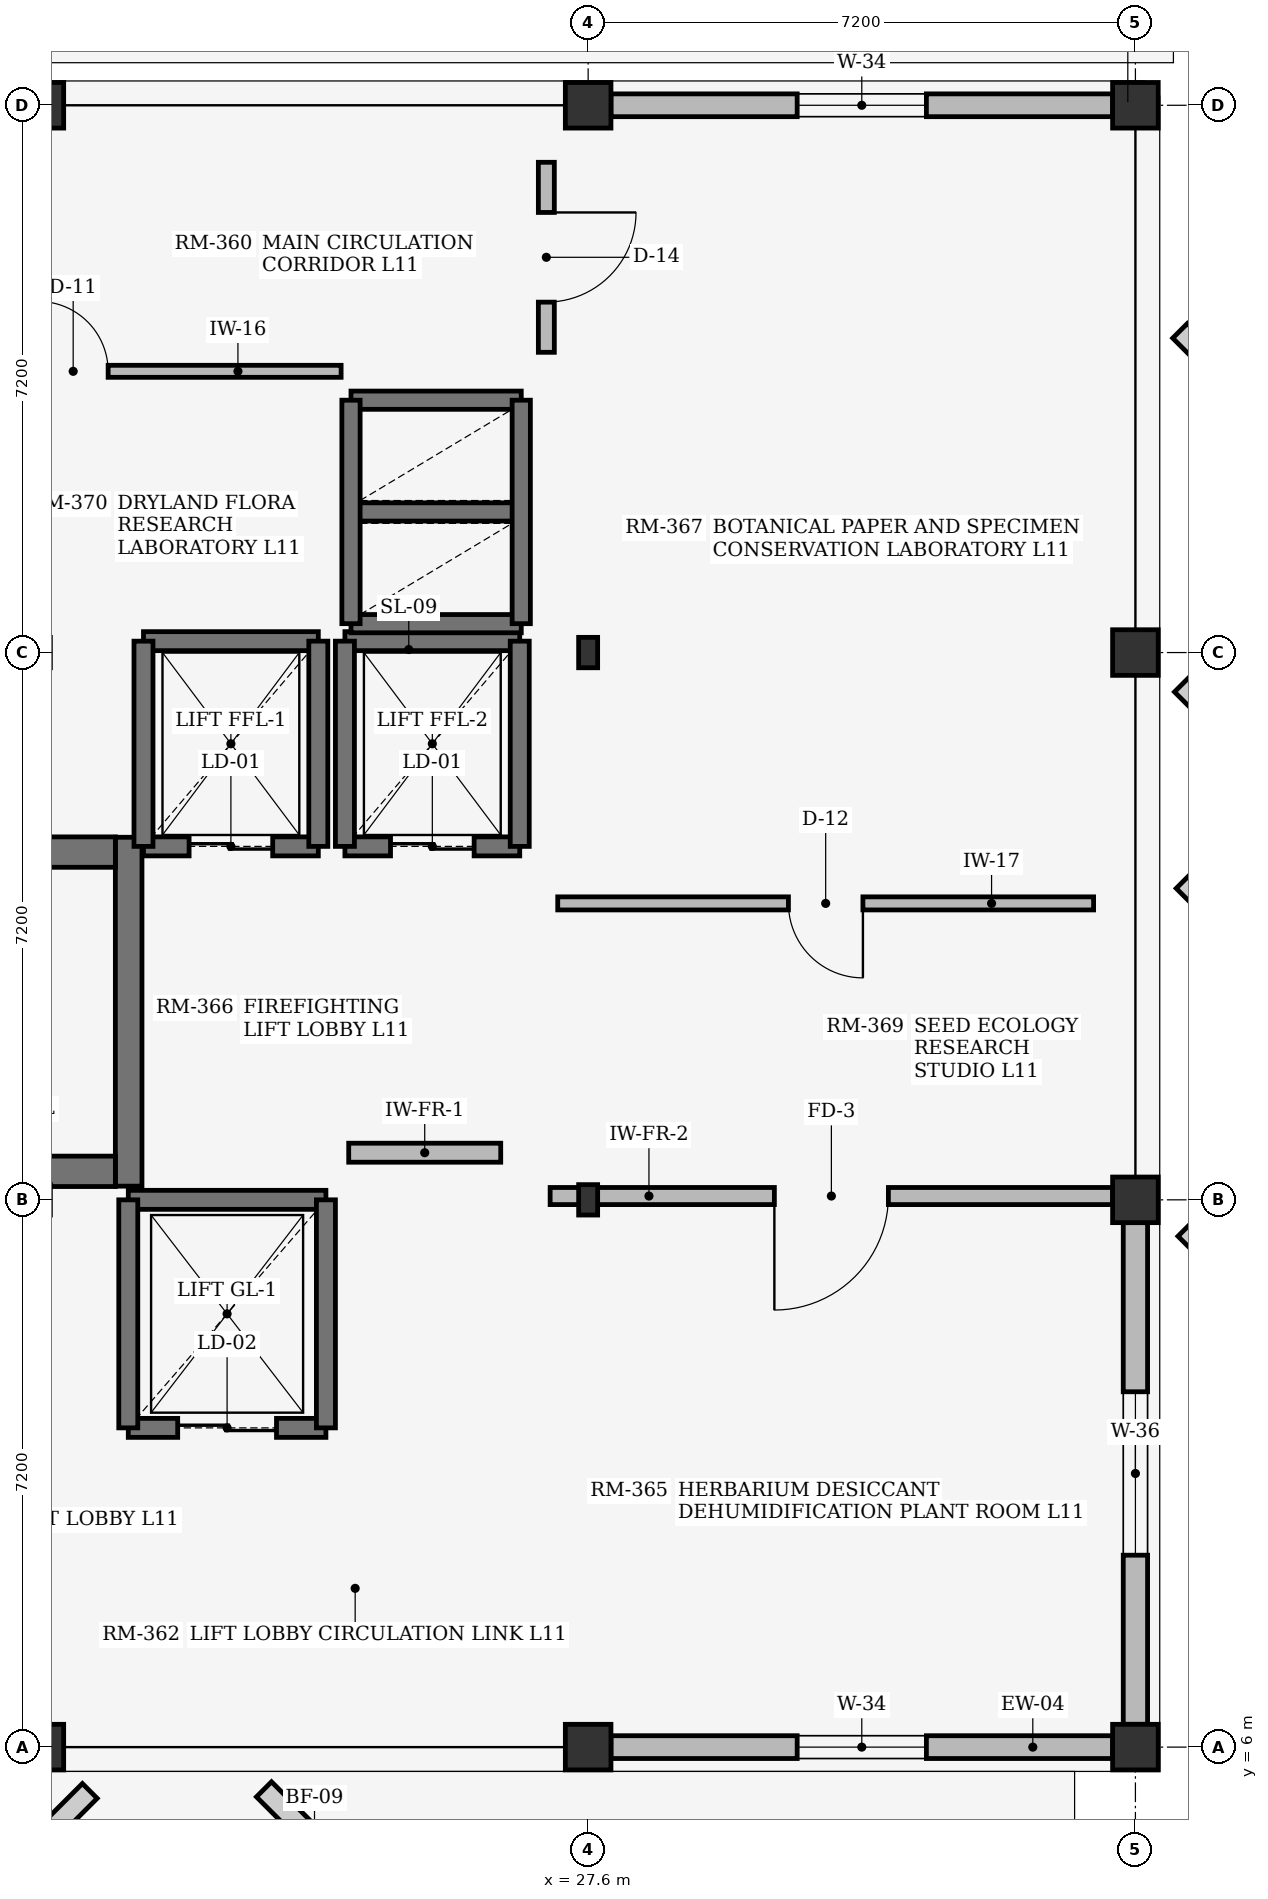
"""IFC4 building model, lengths in metres.
Left out: names, types, materials, properties, quantities, classifications, styles, units other than length and angle.
Written with IfcOpenShell. Run it as: python <this file> out.ifc"""

import sys

from ifc_helpers import new_model, si_unit, direction, frame, frame_2d, origin, origin_2d, place, context, subcontext, project, spatial, rectangle, i_section, extrude, element, fill, save


model = new_model("IFC4")
c1 = context("Model", 3, precision=1e-05, world=origin(), true_north=direction((0.0, 1.0)))
c2 = subcontext(c1, "Body", "Model", "MODEL_VIEW")
j1 = project(units=[si_unit("LENGTHUNIT", "METRE"), si_unit("PLANEANGLEUNIT", "RADIAN")], contexts=[c1])
p1 = place(None, origin())
s1 = spatial("IfcSite", under=j1, at=p1, CompositionType="ELEMENT")
p2 = place(p1, origin())
s2 = spatial("IfcBuilding", under=s1, at=p2, CompositionType="ELEMENT")
p3 = place(p2, frame((0.0, 0.0, 44.4)))
s3 = spatial("IfcBuildingStorey", under=s2, at=p3, CompositionType="ELEMENT", Elevation=44.4)
for number, where, z_axis, x_axis in (
    (1, (20.4, 6.0, 0.0), (0.0, 0.0, 1.0), (1.0, 0.0, 0.0)),
    (2, (20.4, 27.6, 0.0), (0.0, 0.0, 1.0), (1.0, 0.0, 0.0)),
    (3, (27.6, 6.0, 0.0), (0.0, 0.0, 1.0), (1.0, 0.0, 0.0)),
):
    element("IfcColumn", number, at=place(p3, frame(where, z_axis=z_axis, x_axis=x_axis)), inside=s3, PredefinedType="COLUMN", context=c2, shape_type="SweptSolid", body=[
        extrude(rectangle(XDim=0.6, YDim=0.6, at=origin_2d()), origin(), (0.0, 0.0, 1.0), 3.69),
    ])
for number, where, z_axis, x_axis in (
    (4, (27.6, 13.2, 0.0), (0.0, 0.0, 1.0), (1.0, 0.0, 0.0)),
    (5, (27.6, 20.4, 0.0), (0.0, 0.0, 1.0), (1.0, 0.0, 0.0)),
):
    element("IfcColumn", number, at=place(p3, frame(where, z_axis=z_axis, x_axis=x_axis)), inside=s3, PredefinedType="COLUMN", context=c2, shape_type="SweptSolid", body=[
        extrude(i_section(OverallWidth=0.25, OverallDepth=0.4, WebThickness=0.01, FlangeThickness=0.013, at=origin_2d()), origin(), (0.0, 0.0, 1.0), 3.69),
    ])
for number, where, z_axis, x_axis in (
    (6, (27.6, 27.6, 0.0), (0.0, 0.0, 1.0), (1.0, 0.0, 0.0)),
    (7, (34.8, 6.0, 0.0), (0.0, 0.0, 1.0), (1.0, 0.0, 0.0)),
    (8, (34.8, 13.2, 0.0), (0.0, 0.0, 1.0), (1.0, 0.0, 0.0)),
    (9, (34.8, 20.4, 0.0), (0.0, 0.0, 1.0), (1.0, 0.0, 0.0)),
    (10, (34.8, 27.6, 0.0), (0.0, 0.0, 1.0), (1.0, 0.0, 0.0)),
):
    element("IfcColumn", number, at=place(p3, frame(where, z_axis=z_axis, x_axis=x_axis)), inside=s3, PredefinedType="COLUMN", context=c2, shape_type="SweptSolid", body=[
        extrude(rectangle(XDim=0.6, YDim=0.6, at=origin_2d()), origin(), (0.0, 0.0, 1.0), 3.69),
    ])
p4 = place(p3, frame((27.9, 6.0, 0.0), z_axis=(0.0, 0.0, 1.0), x_axis=(1.0, 0.0, 0.0)))
e11 = element("IfcWall", 11, at=p4, inside=s3, PredefinedType="STANDARD", context=c2, shape_type="SweptSolid", body=[
    extrude(rectangle(XDim=6.6, YDim=0.3, at=frame_2d((3.3, 0.0))), origin(), (0.0, 0.0, 1.0), 3.17),
])
p5 = place(p4, frame((2.45, 0.0, 0.75)))
e12 = element("IfcOpeningElement", 12, at=p5, cuts=e11, PredefinedType="OPENING", context=c2, shape_type="SweptSolid", body=[
    extrude(rectangle(XDim=1.7, YDim=1.35, at=frame_2d((0.85, 0.675))), frame((0.0, 0.16, 0.0), z_axis=(0.0, -1.0, 0.0), x_axis=(1.0, 0.0, 0.0)), (0.0, 0.0, 1.0), 0.32),
])
p6 = place(p3, frame((27.9, 27.6, 0.0), z_axis=(0.0, 0.0, 1.0), x_axis=(1.0, 0.0, 0.0)))
e13 = element("IfcWall", 13, at=p6, inside=s3, PredefinedType="STANDARD", context=c2, shape_type="SweptSolid", body=[
    extrude(rectangle(XDim=6.6, YDim=0.3, at=frame_2d((3.3, 0.0))), origin(), (0.0, 0.0, 1.0), 3.17),
])
p7 = place(p6, frame((2.45, 0.0, 0.75)))
e14 = element("IfcOpeningElement", 14, at=p7, cuts=e13, PredefinedType="OPENING", context=c2, shape_type="SweptSolid", body=[
    extrude(rectangle(XDim=1.7, YDim=1.35, at=frame_2d((0.85, 0.675))), frame((0.0, 0.16, 0.0), z_axis=(0.0, -1.0, 0.0), x_axis=(1.0, 0.0, 0.0)), (0.0, 0.0, 1.0), 0.32),
])
p8 = place(p3, frame((34.8, 6.3, 0.0), z_axis=(0.0, 0.0, 1.0), x_axis=(0.0, 1.0, 0.0)))
e15 = element("IfcWall", 15, at=p8, inside=s3, PredefinedType="STANDARD", context=c2, shape_type="SweptSolid", body=[
    extrude(rectangle(XDim=6.6, YDim=0.32, at=frame_2d((3.3, 0.0))), origin(), (0.0, 0.0, 1.0), 3.17),
])
p9 = place(p8, frame((2.225, 0.0, 0.75)))
e16 = element("IfcOpeningElement", 16, at=p9, cuts=e15, PredefinedType="OPENING", context=c2, shape_type="SweptSolid", body=[
    extrude(rectangle(XDim=2.15, YDim=1.35, at=frame_2d((1.075, 0.675))), frame((0.0, 0.17, 0.0), z_axis=(0.0, -1.0, 0.0), x_axis=(1.0, 0.0, 0.0)), (0.0, 0.0, 1.0), 0.34),
])
p10 = place(p3, frame((21.555, 13.38, 0.0), z_axis=(0.0, 0.0, 1.0), x_axis=(0.0, 1.0, 0.0)))
e17 = element("IfcWall", 17, at=p10, inside=s3, PredefinedType="SHEAR", context=c2, shape_type="SweptSolid", body=[
    extrude(rectangle(XDim=4.59, YDim=0.35, at=frame_2d((2.295, 0.0))), origin(), (0.0, 0.0, 1.0), 3.69),
])
for number, where, z_axis, x_axis in (
    (18, (13.4, 13.575, 0.0), (0.0, 0.0, 1.0), (1.0, 0.0, 0.0)),
    (19, (13.4, 17.775, 0.0), (0.0, 0.0, 1.0), (1.0, 0.0, 0.0)),
):
    element("IfcWall", number, at=place(p3, frame(where, z_axis=z_axis, x_axis=x_axis)), inside=s3, PredefinedType="SHEAR", context=c2, shape_type="SweptSolid", body=[
        extrude(rectangle(XDim=7.98, YDim=0.4, at=frame_2d((3.99, 0.0))), origin(), (0.0, 0.0, 1.0), 3.69),
    ])
p11 = place(p3, frame((21.75, 17.85, 0.0), z_axis=(0.0, 0.0, 1.0), x_axis=(1.0, 0.0, 0.0)))
e20 = element("IfcWall", 20, at=p11, inside=s3, PredefinedType="SHEAR", context=c2, shape_type="SweptSolid", body=[
    extrude(rectangle(XDim=2.3, YDim=0.25, at=frame_2d((1.15, 0.0))), origin(), (0.0, 0.0, 1.0), 3.69),
])
p12 = place(p11, frame((0.6, 0.0, 0.0)))
e21 = element("IfcOpeningElement", 21, at=p12, cuts=e20, PredefinedType="OPENING", context=c2, shape_type="SweptSolid", body=[
    extrude(rectangle(XDim=1.1, YDim=2.2, at=frame_2d((0.55, 1.1))), frame((0.0, 0.135, 0.0), z_axis=(0.0, -1.0, 0.0), x_axis=(1.0, 0.0, 0.0)), (0.0, 0.0, 1.0), 0.27),
])
p13 = place(p3, frame((21.75, 20.55, 0.0), z_axis=(0.0, 0.0, 1.0), x_axis=(1.0, 0.0, 0.0)))
e22 = element("IfcWall", 22, at=p13, inside=s3, PredefinedType="SHEAR", context=c2, shape_type="SweptSolid", body=[
    extrude(rectangle(XDim=2.3, YDim=0.25, at=frame_2d((1.15, 0.0))), origin(), (0.0, 0.0, 1.0), 3.69),
])
for number, where, z_axis, x_axis in (
    (23, (21.75, 17.85, 0.0), (0.0, 0.0, 1.0), (0.0, 1.0, 0.0)),
    (24, (24.05, 17.85, 0.0), (0.0, 0.0, 1.0), (0.0, 1.0, 0.0)),
):
    element("IfcWall", number, at=place(p3, frame(where, z_axis=z_axis, x_axis=x_axis)), inside=s3, PredefinedType="SHEAR", context=c2, shape_type="SweptSolid", body=[
        extrude(rectangle(XDim=2.7, YDim=0.25, at=frame_2d((1.35, 0.0))), origin(), (0.0, 0.0, 1.0), 3.69),
    ])
p14 = place(p3, frame((24.4, 17.85, 0.0), z_axis=(0.0, 0.0, 1.0), x_axis=(1.0, 0.0, 0.0)))
e25 = element("IfcWall", 25, at=p14, inside=s3, PredefinedType="SHEAR", context=c2, shape_type="SweptSolid", body=[
    extrude(rectangle(XDim=2.3, YDim=0.25, at=frame_2d((1.15, 0.0))), origin(), (0.0, 0.0, 1.0), 3.69),
])
p15 = place(p14, frame((0.6, 0.0, 0.0)))
e26 = element("IfcOpeningElement", 26, at=p15, cuts=e25, PredefinedType="OPENING", context=c2, shape_type="SweptSolid", body=[
    extrude(rectangle(XDim=1.1, YDim=2.2, at=frame_2d((0.55, 1.1))), frame((0.0, 0.135, 0.0), z_axis=(0.0, -1.0, 0.0), x_axis=(1.0, 0.0, 0.0)), (0.0, 0.0, 1.0), 0.27),
])
p16 = place(p3, frame((24.4, 20.55, 0.0), z_axis=(0.0, 0.0, 1.0), x_axis=(1.0, 0.0, 0.0)))
e27 = element("IfcWall", 27, at=p16, inside=s3, PredefinedType="SHEAR", context=c2, shape_type="SweptSolid", body=[
    extrude(rectangle(XDim=2.3, YDim=0.25, at=frame_2d((1.15, 0.0))), origin(), (0.0, 0.0, 1.0), 3.69),
])
for number, where, z_axis, x_axis in (
    (28, (24.4, 17.85, 0.0), (0.0, 0.0, 1.0), (0.0, 1.0, 0.0)),
    (29, (26.7, 17.85, 0.0), (0.0, 0.0, 1.0), (0.0, 1.0, 0.0)),
):
    element("IfcWall", number, at=place(p3, frame(where, z_axis=z_axis, x_axis=x_axis)), inside=s3, PredefinedType="SHEAR", context=c2, shape_type="SweptSolid", body=[
        extrude(rectangle(XDim=2.7, YDim=0.25, at=frame_2d((1.35, 0.0))), origin(), (0.0, 0.0, 1.0), 3.69),
    ])
p17 = place(p3, frame((21.55, 10.2, 0.0), z_axis=(0.0, 0.0, 1.0), x_axis=(1.0, 0.0, 0.0)))
e30 = element("IfcWall", 30, at=p17, inside=s3, PredefinedType="SHEAR", context=c2, shape_type="SweptSolid", body=[
    extrude(rectangle(XDim=2.6, YDim=0.25, at=frame_2d((1.3, 0.0))), origin(), (0.0, 0.0, 1.0), 3.69),
])
p18 = place(p17, frame((0.65, 0.0, 0.0)))
e31 = element("IfcOpeningElement", 31, at=p18, cuts=e30, PredefinedType="OPENING", context=c2, shape_type="SweptSolid", body=[
    extrude(rectangle(XDim=1.3, YDim=2.25, at=frame_2d((0.65, 1.125))), frame((0.0, 0.135, 0.0), z_axis=(0.0, -1.0, 0.0), x_axis=(1.0, 0.0, 0.0)), (0.0, 0.0, 1.0), 0.27),
])
p19 = place(p3, frame((21.55, 13.2, 0.0), z_axis=(0.0, 0.0, 1.0), x_axis=(1.0, 0.0, 0.0)))
e32 = element("IfcWall", 32, at=p19, inside=s3, PredefinedType="SHEAR", context=c2, shape_type="SweptSolid", body=[
    extrude(rectangle(XDim=2.6, YDim=0.25, at=frame_2d((1.3, 0.0))), origin(), (0.0, 0.0, 1.0), 3.69),
])
for number, where, z_axis, x_axis in (
    (33, (21.55, 10.2, 0.0), (0.0, 0.0, 1.0), (0.0, 1.0, 0.0)),
    (34, (24.15, 10.2, 0.0), (0.0, 0.0, 1.0), (0.0, 1.0, 0.0)),
):
    element("IfcWall", number, at=place(p3, frame(where, z_axis=z_axis, x_axis=x_axis)), inside=s3, PredefinedType="SHEAR", context=c2, shape_type="SweptSolid", body=[
        extrude(rectangle(XDim=3.0, YDim=0.25, at=frame_2d((1.5, 0.0))), origin(), (0.0, 0.0, 1.0), 3.69),
    ])
for number, where, z_axis, x_axis in (
    (35, (24.48, 20.78, 0.0), (0.0, 0.0, 1.0), (1.0, 0.0, 0.0)),
    (36, (24.48, 22.25, 0.0), (0.0, 0.0, 1.0), (1.0, 0.0, 0.0)),
    (37, (24.48, 23.72, 0.0), (0.0, 0.0, 1.0), (1.0, 0.0, 0.0)),
):
    element("IfcWall", number, at=place(p3, frame(where, z_axis=z_axis, x_axis=x_axis)), inside=s3, PredefinedType="SHEAR", context=c2, shape_type="SweptSolid", body=[
        extrude(rectangle(XDim=2.24, YDim=0.24, at=frame_2d((1.12, 0.0))), origin(), (0.0, 0.0, 1.0), 3.69),
    ])
for number, where, z_axis, x_axis in (
    (38, (24.48, 20.78, 0.0), (0.0, 0.0, 1.0), (0.0, 1.0, 0.0)),
    (39, (26.72, 20.78, 0.0), (0.0, 0.0, 1.0), (0.0, 1.0, 0.0)),
):
    element("IfcWall", number, at=place(p3, frame(where, z_axis=z_axis, x_axis=x_axis)), inside=s3, PredefinedType="SHEAR", context=c2, shape_type="SweptSolid", body=[
        extrude(rectangle(XDim=2.94, YDim=0.24, at=frame_2d((1.47, 0.0))), origin(), (0.0, 0.0, 1.0), 3.69),
    ])
p20 = place(p3, frame((24.45, 13.82, 0.0), z_axis=(0.0, 0.0, 1.0), x_axis=(1.0, 0.0, 0.0)))
e40 = element("IfcWall", 40, at=p20, inside=s3, PredefinedType="SOLIDWALL", context=c2, shape_type="SweptSolid", body=[
    extrude(rectangle(XDim=2.0, YDim=0.25, at=frame_2d((1.0, 0.0))), origin(), (0.0, 0.0, 1.0), 3.67),
])
p21 = place(p3, frame((17.3, 24.1, 0.0), z_axis=(0.0, 0.0, 1.0), x_axis=(1.0, 0.0, 0.0)))
e41 = element("IfcWall", 41, at=p21, inside=s3, PredefinedType="PARTITIONING", context=c2, shape_type="SweptSolid", body=[
    extrude(rectangle(XDim=7.05, YDim=0.158, at=frame_2d((3.525, 0.0))), origin(), (0.0, 0.0, 1.0), 3.67),
])
p22 = place(p21, frame((3.065, 0.0, 0.0)))
e42 = element("IfcOpeningElement", 42, at=p22, cuts=e41, PredefinedType="OPENING", context=c2, shape_type="SweptSolid", body=[
    extrude(rectangle(XDim=0.92, YDim=2.1, at=frame_2d((0.46, 1.05))), frame((0.0, 0.089, 0.0), z_axis=(0.0, -1.0, 0.0), x_axis=(1.0, 0.0, 0.0)), (0.0, 0.0, 1.0), 0.178),
])
p23 = place(p3, frame((27.2, 17.1, 0.0), z_axis=(0.0, 0.0, 1.0), x_axis=(1.0, 0.0, 0.0)))
e43 = element("IfcWall", 43, at=p23, inside=s3, PredefinedType="PARTITIONING", context=c2, shape_type="SweptSolid", body=[
    extrude(rectangle(XDim=7.05, YDim=0.172, at=frame_2d((3.525, 0.0))), origin(), (0.0, 0.0, 1.0), 3.67),
])
p24 = place(p23, frame((3.035, 0.0, 0.0)))
e44 = element("IfcOpeningElement", 44, at=p24, cuts=e43, PredefinedType="OPENING", context=c2, shape_type="SweptSolid", body=[
    extrude(rectangle(XDim=0.98, YDim=2.1, at=frame_2d((0.49, 1.05))), frame((0.0, 0.096, 0.0), z_axis=(0.0, -1.0, 0.0), x_axis=(1.0, 0.0, 0.0)), (0.0, 0.0, 1.0), 0.192),
])
p25 = place(p3, frame((27.1, 13.25, 0.0), z_axis=(0.0, 0.0, 1.0), x_axis=(1.0, 0.0, 0.0)))
e45 = element("IfcWall", 45, at=p25, inside=s3, PredefinedType="SOLIDWALL", context=c2, shape_type="SweptSolid", body=[
    extrude(rectangle(XDim=7.4, YDim=0.225, at=frame_2d((3.7, 0.0))), origin(), (0.0, 0.0, 1.0), 3.18),
])
p26 = place(p25, frame((2.95, 0.0, 0.0)))
e46 = element("IfcOpeningElement", 46, at=p26, cuts=e45, PredefinedType="OPENING", context=c2, shape_type="SweptSolid", body=[
    extrude(rectangle(XDim=1.5, YDim=2.2, at=frame_2d((0.75, 1.1))), frame((0.0, 0.123, 0.0), z_axis=(0.0, -1.0, 0.0), x_axis=(1.0, 0.0, 0.0)), (0.0, 0.0, 1.0), 0.245),
])
p27 = place(p3, frame((27.05, 24.35, 0.0), z_axis=(0.0, 0.0, 1.0), x_axis=(0.0, 1.0, 0.0)))
e47 = element("IfcWall", 47, at=p27, inside=s3, PredefinedType="PARTITIONING", context=c2, shape_type="SweptSolid", body=[
    extrude(rectangle(XDim=2.5, YDim=0.21, at=frame_2d((1.25, 0.0))), origin(), (0.0, 0.0, 1.0), 3.67),
])
p28 = place(p27, frame((0.66, 0.0, 0.0)))
e48 = element("IfcOpeningElement", 48, at=p28, cuts=e47, PredefinedType="OPENING", context=c2, shape_type="SweptSolid", body=[
    extrude(rectangle(XDim=1.18, YDim=2.1, at=frame_2d((0.59, 1.05))), frame((0.0, 0.115, 0.0), z_axis=(0.0, -1.0, 0.0), x_axis=(1.0, 0.0, 0.0)), (0.0, 0.0, 1.0), 0.23),
])
p29 = place(p5, origin())
e49 = element("IfcWindow", 49, at=p29, inside=s3, PartitioningType="SINGLE_PANEL", PredefinedType="WINDOW", context=c2, shape_type="SweptSolid", body=[
    extrude(rectangle(XDim=1.7, YDim=1.35, at=frame_2d((0.85, 0.675))), frame((0.0, 0.03, 0.0), z_axis=(0.0, -1.0, 0.0), x_axis=(1.0, 0.0, 0.0)), (0.0, 0.0, 1.0), 0.06),
])
fill(e12, e49)
p30 = place(p7, origin())
e50 = element("IfcWindow", 50, at=p30, inside=s3, PartitioningType="SINGLE_PANEL", PredefinedType="WINDOW", context=c2, shape_type="SweptSolid", body=[
    extrude(rectangle(XDim=1.7, YDim=1.35, at=frame_2d((0.85, 0.675))), frame((0.0, 0.03, 0.0), z_axis=(0.0, -1.0, 0.0), x_axis=(1.0, 0.0, 0.0)), (0.0, 0.0, 1.0), 0.06),
])
fill(e14, e50)
p31 = place(p9, origin())
e51 = element("IfcWindow", 51, at=p31, inside=s3, PartitioningType="SINGLE_PANEL", PredefinedType="WINDOW", context=c2, shape_type="SweptSolid", body=[
    extrude(rectangle(XDim=2.15, YDim=1.35, at=frame_2d((1.075, 0.675))), frame((0.0, 0.03, 0.0), z_axis=(0.0, -1.0, 0.0), x_axis=(1.0, 0.0, 0.0)), (0.0, 0.0, 1.0), 0.06),
])
fill(e16, e51)
p32 = place(p12, origin())
e52 = element("IfcDoor", 52, at=p32, inside=s3, OperationType="DOUBLE_DOOR_SLIDING", PredefinedType="DOOR", context=c2, shape_type="SweptSolid", body=[
    extrude(rectangle(XDim=1.1, YDim=2.2, at=frame_2d((0.55, 1.1))), frame((0.0, 0.025, 0.0), z_axis=(0.0, -1.0, 0.0), x_axis=(1.0, 0.0, 0.0)), (0.0, 0.0, 1.0), 0.05),
])
fill(e21, e52)
p33 = place(p15, origin())
e53 = element("IfcDoor", 53, at=p33, inside=s3, OperationType="DOUBLE_DOOR_SLIDING", PredefinedType="DOOR", context=c2, shape_type="SweptSolid", body=[
    extrude(rectangle(XDim=1.1, YDim=2.2, at=frame_2d((0.55, 1.1))), frame((0.0, 0.025, 0.0), z_axis=(0.0, -1.0, 0.0), x_axis=(1.0, 0.0, 0.0)), (0.0, 0.0, 1.0), 0.05),
])
fill(e26, e53)
p34 = place(p18, origin())
e54 = element("IfcDoor", 54, at=p34, inside=s3, OperationType="DOUBLE_DOOR_SLIDING", PredefinedType="DOOR", context=c2, shape_type="SweptSolid", body=[
    extrude(rectangle(XDim=1.3, YDim=2.25, at=frame_2d((0.65, 1.125))), frame((0.0, 0.025, 0.0), z_axis=(0.0, -1.0, 0.0), x_axis=(1.0, 0.0, 0.0)), (0.0, 0.0, 1.0), 0.05),
])
fill(e31, e54)
p35 = place(p22, origin())
e55 = element("IfcDoor", 55, at=p35, inside=s3, OperationType="SINGLE_SWING_LEFT", PredefinedType="DOOR", context=c2, shape_type="SweptSolid", body=[
    extrude(rectangle(XDim=0.92, YDim=2.1, at=frame_2d((0.46, 1.05))), frame((0.0, 0.025, 0.0), z_axis=(0.0, -1.0, 0.0), x_axis=(1.0, 0.0, 0.0)), (0.0, 0.0, 1.0), 0.05),
])
fill(e42, e55)
p36 = place(p24, origin())
e56 = element("IfcDoor", 56, at=p36, inside=s3, OperationType="SINGLE_SWING_RIGHT", PredefinedType="DOOR", context=c2, shape_type="SweptSolid", body=[
    extrude(rectangle(XDim=0.98, YDim=2.1, at=frame_2d((0.49, 1.05))), frame((0.0, 0.025, 0.0), z_axis=(0.0, -1.0, 0.0), x_axis=(1.0, 0.0, 0.0)), (0.0, 0.0, 1.0), 0.05),
])
fill(e44, e56)
p37 = place(p26, frame((1.5, 0.0, 0.0), z_axis=(0.0, 0.0, 1.0), x_axis=(-1.0, 0.0, 0.0)))
e57 = element("IfcDoor", 57, at=p37, inside=s3, OperationType="SINGLE_SWING_LEFT", PredefinedType="DOOR", context=c2, shape_type="SweptSolid", body=[
    extrude(rectangle(XDim=1.5, YDim=2.2, at=frame_2d((0.75, 1.1))), frame((0.0, 0.025, 0.0), z_axis=(0.0, -1.0, 0.0), x_axis=(1.0, 0.0, 0.0)), (0.0, 0.0, 1.0), 0.05),
])
fill(e46, e57)
p38 = place(p28, origin())
e58 = element("IfcDoor", 58, at=p38, inside=s3, OperationType="SINGLE_SWING_RIGHT", PredefinedType="DOOR", context=c2, shape_type="SweptSolid", body=[
    extrude(rectangle(XDim=1.18, YDim=2.1, at=frame_2d((0.59, 1.05))), frame((0.0, 0.025, 0.0), z_axis=(0.0, -1.0, 0.0), x_axis=(1.0, 0.0, 0.0)), (0.0, 0.0, 1.0), 0.05),
])
fill(e48, e58)
save(model, sys.argv[1])
